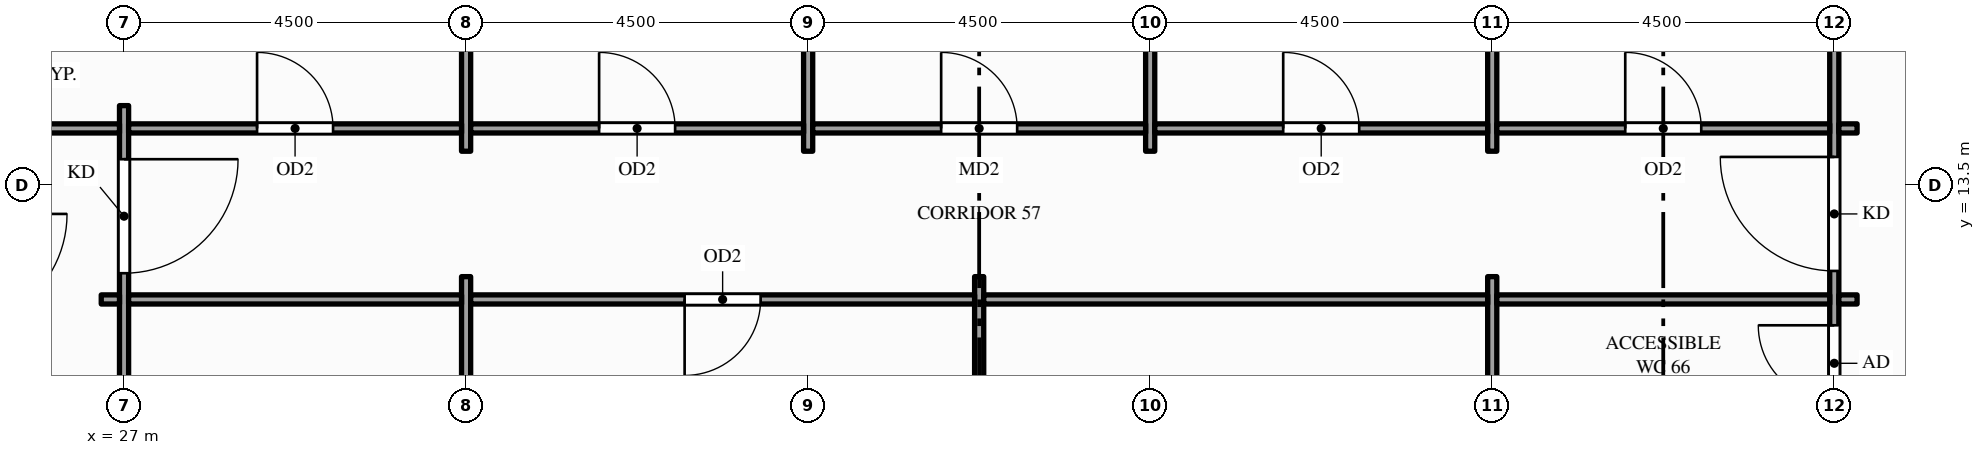
"""IFC4 building model, lengths in metres.
Left out: names, types, materials, properties, quantities, classifications, styles, units other than length and angle.
Written with IfcOpenShell. Run it as: python <this file> out.ifc"""

import sys

from ifc_helpers import new_model, si_unit, direction, frame, frame_2d, origin, place, context, subcontext, project, spatial, rectangle, extrude, element, fill, save


model = new_model("IFC4")
c1 = context("Model", 3, precision=1e-05, world=origin(), true_north=direction((0.0, 1.0)))
c2 = subcontext(c1, "Body", "Model", "MODEL_VIEW")
j1 = project(units=[si_unit("LENGTHUNIT", "METRE"), si_unit("PLANEANGLEUNIT", "RADIAN")], contexts=[c1])
p1 = place(None, origin())
s1 = spatial("IfcSite", under=j1, at=p1, CompositionType="ELEMENT")
p2 = place(p1, origin())
s2 = spatial("IfcBuilding", under=s1, at=p2, CompositionType="ELEMENT")
p3 = place(p2, frame((0.0, 0.0, 239.0)))
s3 = spatial("IfcBuildingStorey", under=s2, at=p3, CompositionType="ELEMENT", Elevation=239.0)
p4 = place(p3, frame((27.0, 4.95, 0.0), z_axis=(0.0, 0.0, 1.0), x_axis=(0.0, 1.0, 0.0)))
e1 = element("IfcWall", 1, at=p4, inside=s3, PredefinedType="PARTITIONING", context=c2, shape_type="SweptSolid", body=[
    extrude(rectangle(XDim=9.6, YDim=0.12, at=frame_2d((4.8, 0.0))), origin(), (0.0, 0.0, 1.0), 2.77),
])
p5 = place(p4, frame((0.705, 0.0, 0.0)))
e2 = element("IfcOpeningElement", 2, at=p5, cuts=e1, PredefinedType="OPENING", context=c2, shape_type="SweptSolid", body=[
    extrude(rectangle(XDim=1.5, YDim=2.1, at=frame_2d((0.75, 1.05))), frame((0.0, 0.07, 0.0), z_axis=(0.0, -1.0, 0.0), x_axis=(1.0, 0.0, 0.0)), (0.0, 0.0, 1.0), 0.14),
])
p6 = place(p4, frame((7.395, 0.0, 0.0)))
e3 = element("IfcOpeningElement", 3, at=p6, cuts=e1, PredefinedType="OPENING", context=c2, shape_type="SweptSolid", body=[
    extrude(rectangle(XDim=1.5, YDim=2.1, at=frame_2d((0.75, 1.05))), frame((0.0, 0.07, 0.0), z_axis=(0.0, -1.0, 0.0), x_axis=(1.0, 0.0, 0.0)), (0.0, 0.0, 1.0), 0.14),
])
p7 = place(p3, frame((31.5, 7.2, 0.0), z_axis=(0.0, 0.0, 1.0), x_axis=(0.0, 1.0, 0.0)))
e4 = element("IfcWall", 4, at=p7, inside=s3, PredefinedType="PARTITIONING", context=c2, shape_type="SweptSolid", body=[
    extrude(rectangle(XDim=5.1, YDim=0.12, at=frame_2d((2.55, 0.0))), origin(), (0.0, 0.0, 1.0), 2.77),
])
for number, where, z_axis, x_axis in (
    (5, (31.5, 13.95, 0.0), (0.0, 0.0, 1.0), (0.0, 1.0, 0.0)),
    (6, (36.0, 13.95, 0.0), (0.0, 0.0, 1.0), (0.0, 1.0, 0.0)),
):
    element("IfcWall", number, at=place(p3, frame(where, z_axis=z_axis, x_axis=x_axis)), inside=s3, PredefinedType="PARTITIONING", context=c2, shape_type="SweptSolid", body=[
        extrude(rectangle(XDim=6.9, YDim=0.12, at=frame_2d((3.45, 0.0))), origin(), (0.0, 0.0, 1.0), 2.77),
    ])
p8 = place(p3, frame((38.25, 7.2, 0.0), z_axis=(0.0, 0.0, 1.0), x_axis=(0.0, 1.0, 0.0)))
e7 = element("IfcWall", 7, at=p8, inside=s3, PredefinedType="PARTITIONING", context=c2, shape_type="SweptSolid", body=[
    extrude(rectangle(XDim=5.1, YDim=0.12, at=frame_2d((2.55, 0.0))), origin(), (0.0, 0.0, 1.0), 2.77),
])
p9 = place(p3, frame((40.5, 13.95, 0.0), z_axis=(0.0, 0.0, 1.0), x_axis=(0.0, 1.0, 0.0)))
e8 = element("IfcWall", 8, at=p9, inside=s3, PredefinedType="PARTITIONING", context=c2, shape_type="SweptSolid", body=[
    extrude(rectangle(XDim=6.9, YDim=0.12, at=frame_2d((3.45, 0.0))), origin(), (0.0, 0.0, 1.0), 2.77),
])
p10 = place(p3, frame((45.0, 7.2, 0.0), z_axis=(0.0, 0.0, 1.0), x_axis=(0.0, 1.0, 0.0)))
e9 = element("IfcWall", 9, at=p10, inside=s3, PredefinedType="PARTITIONING", context=c2, shape_type="SweptSolid", body=[
    extrude(rectangle(XDim=5.1, YDim=0.12, at=frame_2d((2.55, 0.0))), origin(), (0.0, 0.0, 1.0), 2.77),
])
p11 = place(p3, frame((45.0, 13.95, 0.0), z_axis=(0.0, 0.0, 1.0), x_axis=(0.0, 1.0, 0.0)))
e10 = element("IfcWall", 10, at=p11, inside=s3, PredefinedType="PARTITIONING", context=c2, shape_type="SweptSolid", body=[
    extrude(rectangle(XDim=6.9, YDim=0.12, at=frame_2d((3.45, 0.0))), origin(), (0.0, 0.0, 1.0), 2.77),
])
p12 = place(p3, frame((49.5, -1.35, 0.0), z_axis=(0.0, 0.0, 1.0), x_axis=(0.0, 1.0, 0.0)))
e11 = element("IfcWall", 11, at=p12, inside=s3, PredefinedType="PARTITIONING", context=c2, shape_type="SweptSolid", body=[
    extrude(rectangle(XDim=22.2, YDim=0.12, at=frame_2d((11.1, 0.0))), origin(), (0.0, 0.0, 1.0), 2.3),
])
p13 = place(p12, frame((6.975, 0.0, 0.0)))
e12 = element("IfcOpeningElement", 12, at=p13, cuts=e11, PredefinedType="OPENING", context=c2, shape_type="SweptSolid", body=[
    extrude(rectangle(XDim=1.5, YDim=2.1, at=frame_2d((0.75, 1.05))), frame((0.0, 0.07, 0.0), z_axis=(0.0, -1.0, 0.0), x_axis=(1.0, 0.0, 0.0)), (0.0, 0.0, 1.0), 0.14),
])
p14 = place(p12, frame((13.725, 0.0, 0.0)))
e13 = element("IfcOpeningElement", 13, at=p14, cuts=e11, PredefinedType="OPENING", context=c2, shape_type="SweptSolid", body=[
    extrude(rectangle(XDim=1.5, YDim=2.1, at=frame_2d((0.75, 1.05))), frame((0.0, 0.07, 0.0), z_axis=(0.0, -1.0, 0.0), x_axis=(1.0, 0.0, 0.0)), (0.0, 0.0, 1.0), 0.14),
])
p15 = place(p12, frame((9.29, 0.0, 0.0)))
e14 = element("IfcOpeningElement", 14, at=p15, cuts=e11, PredefinedType="OPENING", context=c2, shape_type="SweptSolid", body=[
    extrude(rectangle(XDim=0.9, YDim=2.1, at=frame_2d((0.45, 1.05))), frame((0.0, 0.07, 0.0), z_axis=(0.0, -1.0, 0.0), x_axis=(1.0, 0.0, 0.0)), (0.0, 0.0, 1.0), 0.14),
])
p16 = place(p12, frame((10.65, 0.0, 0.0)))
e15 = element("IfcOpeningElement", 15, at=p16, cuts=e11, PredefinedType="OPENING", context=c2, shape_type="SweptSolid", body=[
    extrude(rectangle(XDim=0.9, YDim=2.1, at=frame_2d((0.45, 1.05))), frame((0.0, 0.07, 0.0), z_axis=(0.0, -1.0, 0.0), x_axis=(1.0, 0.0, 0.0)), (0.0, 0.0, 1.0), 0.14),
])
p17 = place(p12, frame((12.01, 0.0, 0.0)))
e16 = element("IfcOpeningElement", 16, at=p17, cuts=e11, PredefinedType="OPENING", context=c2, shape_type="SweptSolid", body=[
    extrude(rectangle(XDim=1.0, YDim=2.1, at=frame_2d((0.5, 1.05))), frame((0.0, 0.07, 0.0), z_axis=(0.0, -1.0, 0.0), x_axis=(1.0, 0.0, 0.0)), (0.0, 0.0, 1.0), 0.14),
])
p18 = place(p3, frame((26.7, 12.0, 0.0), z_axis=(0.0, 0.0, 1.0), x_axis=(1.0, 0.0, 0.0)))
e17 = element("IfcWall", 17, at=p18, inside=s3, PredefinedType="PARTITIONING", context=c2, shape_type="SweptSolid", body=[
    extrude(rectangle(XDim=0.24, YDim=0.12, at=frame_2d((0.12, 0.0))), origin(), (0.0, 0.0, 1.0), 2.77),
])
p19 = place(p3, frame((27.06, 12.0, 0.0), z_axis=(0.0, 0.0, 1.0), x_axis=(1.0, 0.0, 0.0)))
e18 = element("IfcWall", 18, at=p19, inside=s3, PredefinedType="PARTITIONING", context=c2, shape_type="SweptSolid", body=[
    extrude(rectangle(XDim=4.38, YDim=0.12, at=frame_2d((2.19, 0.0))), origin(), (0.0, 0.0, 1.0), 2.77),
])
p20 = place(p3, frame((31.56, 12.0, 0.0), z_axis=(0.0, 0.0, 1.0), x_axis=(1.0, 0.0, 0.0)))
e19 = element("IfcWall", 19, at=p20, inside=s3, PredefinedType="PARTITIONING", context=c2, shape_type="SweptSolid", body=[
    extrude(rectangle(XDim=6.63, YDim=0.12, at=frame_2d((3.315, 0.0))), origin(), (0.0, 0.0, 1.0), 2.77),
])
p21 = place(p20, frame((2.815, 0.0, 0.0)))
e20 = element("IfcOpeningElement", 20, at=p21, cuts=e19, PredefinedType="OPENING", context=c2, shape_type="SweptSolid", body=[
    extrude(rectangle(XDim=1.0, YDim=2.1, at=frame_2d((0.5, 1.05))), frame((0.0, 0.07, 0.0), z_axis=(0.0, -1.0, 0.0), x_axis=(1.0, 0.0, 0.0)), (0.0, 0.0, 1.0), 0.14),
])
p22 = place(p3, frame((38.31, 12.0, 0.0), z_axis=(0.0, 0.0, 1.0), x_axis=(1.0, 0.0, 0.0)))
e21 = element("IfcWall", 21, at=p22, inside=s3, PredefinedType="PARTITIONING", context=c2, shape_type="SweptSolid", body=[
    extrude(rectangle(XDim=6.63, YDim=0.12, at=frame_2d((3.315, 0.0))), origin(), (0.0, 0.0, 1.0), 2.77),
])
p23 = place(p3, frame((45.06, 12.0, 0.0), z_axis=(0.0, 0.0, 1.0), x_axis=(1.0, 0.0, 0.0)))
e22 = element("IfcWall", 22, at=p23, inside=s3, PredefinedType="PARTITIONING", context=c2, shape_type="SweptSolid", body=[
    extrude(rectangle(XDim=4.38, YDim=0.12, at=frame_2d((2.19, 0.0))), origin(), (0.0, 0.0, 1.0), 2.77),
])
p24 = place(p3, frame((49.56, 12.0, 0.0), z_axis=(0.0, 0.0, 1.0), x_axis=(1.0, 0.0, 0.0)))
e23 = element("IfcWall", 23, at=p24, inside=s3, PredefinedType="PARTITIONING", context=c2, shape_type="SweptSolid", body=[
    extrude(rectangle(XDim=0.24, YDim=0.12, at=frame_2d((0.12, 0.0))), origin(), (0.0, 0.0, 1.0), 2.77),
])
p25 = place(p3, frame((24.81, 14.25, 0.0), z_axis=(0.0, 0.0, 1.0), x_axis=(1.0, 0.0, 0.0)))
e24 = element("IfcWall", 24, at=p25, inside=s3, PredefinedType="PARTITIONING", context=c2, shape_type="SweptSolid", body=[
    extrude(rectangle(XDim=2.13, YDim=0.12, at=frame_2d((1.065, 0.0))), origin(), (0.0, 0.0, 1.0), 2.77),
])
p26 = place(p3, frame((27.06, 14.25, 0.0), z_axis=(0.0, 0.0, 1.0), x_axis=(1.0, 0.0, 0.0)))
e25 = element("IfcWall", 25, at=p26, inside=s3, PredefinedType="PARTITIONING", context=c2, shape_type="SweptSolid", body=[
    extrude(rectangle(XDim=4.38, YDim=0.12, at=frame_2d((2.19, 0.0))), origin(), (0.0, 0.0, 1.0), 2.77),
])
p27 = place(p26, frame((1.69, 0.0, 0.0)))
e26 = element("IfcOpeningElement", 26, at=p27, cuts=e25, PredefinedType="OPENING", context=c2, shape_type="SweptSolid", body=[
    extrude(rectangle(XDim=1.0, YDim=2.1, at=frame_2d((0.5, 1.05))), frame((0.0, 0.07, 0.0), z_axis=(0.0, -1.0, 0.0), x_axis=(1.0, 0.0, 0.0)), (0.0, 0.0, 1.0), 0.14),
])
p28 = place(p3, frame((31.56, 14.25, 0.0), z_axis=(0.0, 0.0, 1.0), x_axis=(1.0, 0.0, 0.0)))
e27 = element("IfcWall", 27, at=p28, inside=s3, PredefinedType="PARTITIONING", context=c2, shape_type="SweptSolid", body=[
    extrude(rectangle(XDim=4.38, YDim=0.12, at=frame_2d((2.19, 0.0))), origin(), (0.0, 0.0, 1.0), 2.77),
])
p29 = place(p28, frame((1.69, 0.0, 0.0)))
e28 = element("IfcOpeningElement", 28, at=p29, cuts=e27, PredefinedType="OPENING", context=c2, shape_type="SweptSolid", body=[
    extrude(rectangle(XDim=1.0, YDim=2.1, at=frame_2d((0.5, 1.05))), frame((0.0, 0.07, 0.0), z_axis=(0.0, -1.0, 0.0), x_axis=(1.0, 0.0, 0.0)), (0.0, 0.0, 1.0), 0.14),
])
p30 = place(p3, frame((36.06, 14.25, 0.0), z_axis=(0.0, 0.0, 1.0), x_axis=(1.0, 0.0, 0.0)))
e29 = element("IfcWall", 29, at=p30, inside=s3, PredefinedType="PARTITIONING", context=c2, shape_type="SweptSolid", body=[
    extrude(rectangle(XDim=4.38, YDim=0.12, at=frame_2d((2.19, 0.0))), origin(), (0.0, 0.0, 1.0), 2.77),
])
p31 = place(p30, frame((1.69, 0.0, 0.0)))
e30 = element("IfcOpeningElement", 30, at=p31, cuts=e29, PredefinedType="OPENING", context=c2, shape_type="SweptSolid", body=[
    extrude(rectangle(XDim=1.0, YDim=2.1, at=frame_2d((0.5, 1.05))), frame((0.0, 0.07, 0.0), z_axis=(0.0, -1.0, 0.0), x_axis=(1.0, 0.0, 0.0)), (0.0, 0.0, 1.0), 0.14),
])
p32 = place(p3, frame((40.56, 14.25, 0.0), z_axis=(0.0, 0.0, 1.0), x_axis=(1.0, 0.0, 0.0)))
e31 = element("IfcWall", 31, at=p32, inside=s3, PredefinedType="PARTITIONING", context=c2, shape_type="SweptSolid", body=[
    extrude(rectangle(XDim=4.38, YDim=0.12, at=frame_2d((2.19, 0.0))), origin(), (0.0, 0.0, 1.0), 2.77),
])
p33 = place(p32, frame((1.69, 0.0, 0.0)))
e32 = element("IfcOpeningElement", 32, at=p33, cuts=e31, PredefinedType="OPENING", context=c2, shape_type="SweptSolid", body=[
    extrude(rectangle(XDim=1.0, YDim=2.1, at=frame_2d((0.5, 1.05))), frame((0.0, 0.07, 0.0), z_axis=(0.0, -1.0, 0.0), x_axis=(1.0, 0.0, 0.0)), (0.0, 0.0, 1.0), 0.14),
])
p34 = place(p3, frame((45.06, 14.25, 0.0), z_axis=(0.0, 0.0, 1.0), x_axis=(1.0, 0.0, 0.0)))
e33 = element("IfcWall", 33, at=p34, inside=s3, PredefinedType="PARTITIONING", context=c2, shape_type="SweptSolid", body=[
    extrude(rectangle(XDim=4.38, YDim=0.12, at=frame_2d((2.19, 0.0))), origin(), (0.0, 0.0, 1.0), 2.77),
])
p35 = place(p34, frame((1.69, 0.0, 0.0)))
e34 = element("IfcOpeningElement", 34, at=p35, cuts=e33, PredefinedType="OPENING", context=c2, shape_type="SweptSolid", body=[
    extrude(rectangle(XDim=1.0, YDim=2.1, at=frame_2d((0.5, 1.05))), frame((0.0, 0.07, 0.0), z_axis=(0.0, -1.0, 0.0), x_axis=(1.0, 0.0, 0.0)), (0.0, 0.0, 1.0), 0.14),
])
p36 = place(p3, frame((49.56, 14.25, 0.0), z_axis=(0.0, 0.0, 1.0), x_axis=(1.0, 0.0, 0.0)))
e35 = element("IfcWall", 35, at=p36, inside=s3, PredefinedType="PARTITIONING", context=c2, shape_type="SweptSolid", body=[
    extrude(rectangle(XDim=0.24, YDim=0.12, at=frame_2d((0.12, 0.0))), origin(), (0.0, 0.0, 1.0), 2.77),
])
p37 = place(p6, origin())
e36 = element("IfcDoor", 36, at=p37, inside=s3, OperationType="SINGLE_SWING_RIGHT", PredefinedType="DOOR", context=c2, shape_type="SweptSolid", body=[
    extrude(rectangle(XDim=1.5, YDim=2.1, at=frame_2d((0.75, 1.05))), frame((0.0, 0.025, 0.0), z_axis=(0.0, -1.0, 0.0), x_axis=(1.0, 0.0, 0.0)), (0.0, 0.0, 1.0), 0.05),
])
fill(e3, e36)
p38 = place(p14, origin())
e37 = element("IfcDoor", 37, at=p38, inside=s3, OperationType="SINGLE_SWING_RIGHT", PredefinedType="DOOR", context=c2, shape_type="SweptSolid", body=[
    extrude(rectangle(XDim=1.5, YDim=2.1, at=frame_2d((0.75, 1.05))), frame((0.0, 0.025, 0.0), z_axis=(0.0, -1.0, 0.0), x_axis=(1.0, 0.0, 0.0)), (0.0, 0.0, 1.0), 0.05),
])
fill(e13, e37)
p39 = place(p21, origin())
e38 = element("IfcDoor", 38, at=p39, inside=s3, OperationType="SINGLE_SWING_LEFT", PredefinedType="DOOR", context=c2, shape_type="SweptSolid", body=[
    extrude(rectangle(XDim=1.0, YDim=2.1, at=frame_2d((0.5, 1.05))), frame((0.0, 0.025, 0.0), z_axis=(0.0, -1.0, 0.0), x_axis=(1.0, 0.0, 0.0)), (0.0, 0.0, 1.0), 0.05),
])
fill(e20, e38)
p40 = place(p17, origin())
e39 = element("IfcDoor", 39, at=p40, inside=s3, OperationType="SINGLE_SWING_RIGHT", PredefinedType="DOOR", context=c2, shape_type="SweptSolid", body=[
    extrude(rectangle(XDim=1.0, YDim=2.1, at=frame_2d((0.5, 1.05))), frame((0.0, 0.025, 0.0), z_axis=(0.0, -1.0, 0.0), x_axis=(1.0, 0.0, 0.0)), (0.0, 0.0, 1.0), 0.05),
])
fill(e16, e39)
p41 = place(p27, origin())
e40 = element("IfcDoor", 40, at=p41, inside=s3, OperationType="SINGLE_SWING_LEFT", PredefinedType="DOOR", context=c2, shape_type="SweptSolid", body=[
    extrude(rectangle(XDim=1.0, YDim=2.1, at=frame_2d((0.5, 1.05))), frame((0.0, 0.025, 0.0), z_axis=(0.0, -1.0, 0.0), x_axis=(1.0, 0.0, 0.0)), (0.0, 0.0, 1.0), 0.05),
])
fill(e26, e40)
p42 = place(p29, origin())
e41 = element("IfcDoor", 41, at=p42, inside=s3, OperationType="SINGLE_SWING_LEFT", PredefinedType="DOOR", context=c2, shape_type="SweptSolid", body=[
    extrude(rectangle(XDim=1.0, YDim=2.1, at=frame_2d((0.5, 1.05))), frame((0.0, 0.025, 0.0), z_axis=(0.0, -1.0, 0.0), x_axis=(1.0, 0.0, 0.0)), (0.0, 0.0, 1.0), 0.05),
])
fill(e28, e41)
p43 = place(p31, origin())
e42 = element("IfcDoor", 42, at=p43, inside=s3, OperationType="SINGLE_SWING_LEFT", PredefinedType="DOOR", context=c2, shape_type="SweptSolid", body=[
    extrude(rectangle(XDim=1.0, YDim=2.1, at=frame_2d((0.5, 1.05))), frame((0.0, 0.025, 0.0), z_axis=(0.0, -1.0, 0.0), x_axis=(1.0, 0.0, 0.0)), (0.0, 0.0, 1.0), 0.05),
])
fill(e30, e42)
p44 = place(p33, origin())
e43 = element("IfcDoor", 43, at=p44, inside=s3, OperationType="SINGLE_SWING_LEFT", PredefinedType="DOOR", context=c2, shape_type="SweptSolid", body=[
    extrude(rectangle(XDim=1.0, YDim=2.1, at=frame_2d((0.5, 1.05))), frame((0.0, 0.025, 0.0), z_axis=(0.0, -1.0, 0.0), x_axis=(1.0, 0.0, 0.0)), (0.0, 0.0, 1.0), 0.05),
])
fill(e32, e43)
p45 = place(p35, origin())
e44 = element("IfcDoor", 44, at=p45, inside=s3, OperationType="SINGLE_SWING_LEFT", PredefinedType="DOOR", context=c2, shape_type="SweptSolid", body=[
    extrude(rectangle(XDim=1.0, YDim=2.1, at=frame_2d((0.5, 1.05))), frame((0.0, 0.025, 0.0), z_axis=(0.0, -1.0, 0.0), x_axis=(1.0, 0.0, 0.0)), (0.0, 0.0, 1.0), 0.05),
])
fill(e34, e44)
save(model, sys.argv[1])
